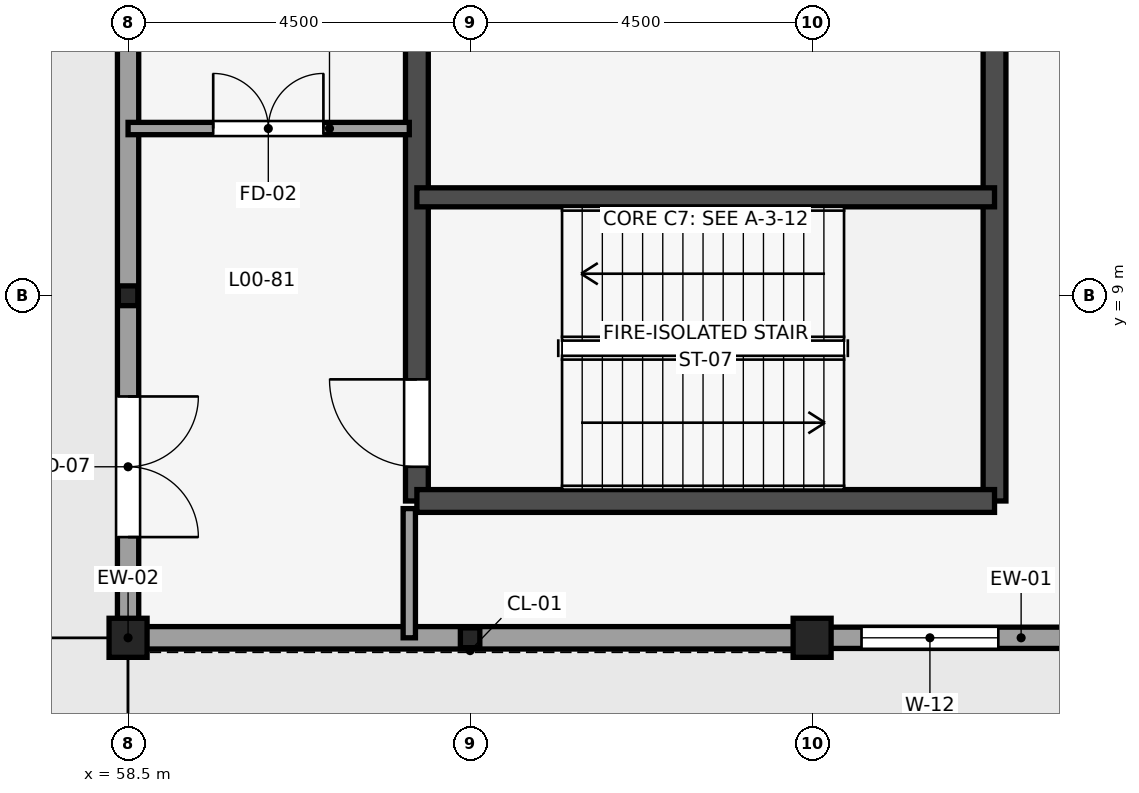
"""IFC4 building model, lengths in metres.
Left out: names, types, materials, properties, quantities, classifications, styles, units other than length and angle.
Written with IfcOpenShell. Run it as: python <this file> out.ifc"""

import sys

from ifc_helpers import new_model, si_unit, direction, frame, frame_2d, origin, origin_2d, place, context, subcontext, project, spatial, rectangle, i_section, extrude, element, fill, save


model = new_model("IFC4")
c1 = context("Model", 3, precision=1e-05, world=origin(), true_north=direction((0.0, 1.0)))
c2 = subcontext(c1, "Body", "Model", "MODEL_VIEW")
j1 = project(units=[si_unit("LENGTHUNIT", "METRE"), si_unit("PLANEANGLEUNIT", "RADIAN")], contexts=[c1])
p1 = place(None, origin())
s1 = spatial("IfcSite", under=j1, at=p1, CompositionType="ELEMENT")
p2 = place(p1, origin())
s2 = spatial("IfcBuilding", under=s1, at=p2, CompositionType="ELEMENT")
p3 = place(p2, origin())
s3 = spatial("IfcBuildingStorey", under=s2, at=p3, CompositionType="ELEMENT", Elevation=0.0)
for number, where, z_axis, x_axis in (
    (1, (58.5, 4.5, 0.0), (0.0, 0.0, 1.0), (1.0, 0.0, 0.0)),
    (2, (67.5, 4.5, 0.0), (0.0, 0.0, 1.0), (1.0, 0.0, 0.0)),
):
    element("IfcColumn", number, at=place(p3, frame(where, z_axis=z_axis, x_axis=x_axis)), inside=s3, PredefinedType="COLUMN", context=c2, shape_type="SweptSolid", body=[
        extrude(i_section(OverallWidth=0.5, OverallDepth=0.514, WebThickness=0.022, FlangeThickness=0.032, FilletRadius=0.016, at=origin_2d()), origin(), (0.0, 0.0, 1.0), 5.4),
    ])
for number, where, z_axis, x_axis in (
    (3, (63.0, 4.5, 0.0), (0.0, 0.0, 1.0), (1.0, 0.0, 0.0)),
    (4, (58.5, 9.0, 0.0), (0.0, 0.0, 1.0), (1.0, 0.0, 0.0)),
):
    element("IfcColumn", number, at=place(p3, frame(where, z_axis=z_axis, x_axis=x_axis)), inside=s3, PredefinedType="PILASTER", context=c2, shape_type="SweptSolid", body=[
        extrude(i_section(OverallWidth=0.256, OverallDepth=0.26, WebThickness=0.01, FlangeThickness=0.017, FilletRadius=0.014, at=origin_2d()), origin(), (0.0, 0.0, 1.0), 5.4),
    ])
p4 = place(p3, frame((62.3, 6.3, 0.0), z_axis=(0.0, 0.0, 1.0), x_axis=(0.0, 1.0, 0.0)))
e5 = element("IfcWall", 5, at=p4, inside=s3, PredefinedType="SHEAR", context=c2, shape_type="SweptSolid", body=[
    extrude(rectangle(XDim=7.4, YDim=0.3, at=frame_2d((3.7, 0.0))), origin(), (0.0, 0.0, 1.0), 5.4),
])
p5 = place(p4, frame((0.45, 0.0, 0.0)))
e6 = element("IfcOpeningElement", 6, at=p5, cuts=e5, PredefinedType="OPENING", context=c2, shape_type="SweptSolid", body=[
    extrude(rectangle(XDim=1.15, YDim=2.15, at=frame_2d((0.575, 1.075))), frame((0.0, 0.16, 0.0), z_axis=(0.0, -1.0, 0.0), x_axis=(1.0, 0.0, 0.0)), (0.0, 0.0, 1.0), 0.32),
])
p6 = place(p3, frame((69.9, 6.3, 0.0), z_axis=(0.0, 0.0, 1.0), x_axis=(0.0, 1.0, 0.0)))
e7 = element("IfcWall", 7, at=p6, inside=s3, PredefinedType="SHEAR", context=c2, shape_type="SweptSolid", body=[
    extrude(rectangle(XDim=7.4, YDim=0.3, at=frame_2d((3.7, 0.0))), origin(), (0.0, 0.0, 1.0), 5.4),
])
p7 = place(p3, frame((62.3, 6.3, 0.0), z_axis=(0.0, 0.0, 1.0), x_axis=(1.0, 0.0, 0.0)))
e8 = element("IfcWall", 8, at=p7, inside=s3, PredefinedType="SHEAR", context=c2, shape_type="SweptSolid", body=[
    extrude(rectangle(XDim=7.6, YDim=0.3, at=frame_2d((3.8, 0.0))), origin(), (0.0, 0.0, 1.0), 5.4),
])
p8 = place(p3, frame((62.3, 10.295, 0.0), z_axis=(0.0, 0.0, 1.0), x_axis=(1.0, 0.0, 0.0)))
e9 = element("IfcWall", 9, at=p8, inside=s3, PredefinedType="SHEAR", context=c2, shape_type="SweptSolid", body=[
    extrude(rectangle(XDim=7.6, YDim=0.25, at=frame_2d((3.8, 0.0))), origin(), (0.0, 0.0, 1.0), 5.4),
])
p9 = place(p3, frame((58.5, 4.5, 0.0), z_axis=(0.0, 0.0, 1.0), x_axis=(1.0, 0.0, 0.0)))
e10 = element("IfcWall", 10, at=p9, inside=s3, PredefinedType="STANDARD", context=c2, shape_type="SweptSolid", body=[
    extrude(rectangle(XDim=9.0, YDim=0.295, at=frame_2d((4.5, 0.0))), origin(), (0.0, 0.0, 1.0), 4.746),
])
p10 = place(p3, frame((67.5, 4.5, 0.0), z_axis=(0.0, 0.0, 1.0), x_axis=(1.0, 0.0, 0.0)))
e11 = element("IfcWall", 11, at=p10, inside=s3, PredefinedType="STANDARD", context=c2, shape_type="SweptSolid", body=[
    extrude(rectangle(XDim=9.0, YDim=0.28, at=frame_2d((4.5, 0.0))), origin(), (0.0, 0.0, 1.0), 4.746),
])
p11 = place(p10, frame((0.65, 0.0, 0.9)))
e12 = element("IfcOpeningElement", 12, at=p11, cuts=e11, PredefinedType="OPENING", context=c2, shape_type="SweptSolid", body=[
    extrude(rectangle(XDim=1.8, YDim=2.4, at=frame_2d((0.9, 1.2))), frame((0.0, 0.15, 0.0), z_axis=(0.0, -1.0, 0.0), x_axis=(1.0, 0.0, 0.0)), (0.0, 0.0, 1.0), 0.3),
])
p12 = place(p10, frame((5.55, 0.0, 0.0)))
e13 = element("IfcOpeningElement", 13, at=p12, cuts=e11, PredefinedType="OPENING", context=c2, shape_type="SweptSolid", body=[
    extrude(rectangle(XDim=2.4, YDim=2.7, at=frame_2d((1.2, 1.35))), frame((0.0, 0.15, 0.0), z_axis=(0.0, -1.0, 0.0), x_axis=(1.0, 0.0, 0.0)), (0.0, 0.0, 1.0), 0.3),
])
p13 = place(p3, frame((58.5, 13.5, 0.0), z_axis=(0.0, 0.0, 1.0), x_axis=(0.0, -1.0, 0.0)))
e14 = element("IfcWall", 14, at=p13, inside=s3, PredefinedType="STANDARD", context=c2, shape_type="SweptSolid", body=[
    extrude(rectangle(XDim=9.0, YDim=0.28, at=frame_2d((4.5, 0.0))), origin(), (0.0, 0.0, 1.0), 4.746),
])
p14 = place(p13, frame((5.825, 0.0, 0.0)))
e15 = element("IfcOpeningElement", 15, at=p14, cuts=e14, PredefinedType="OPENING", context=c2, shape_type="SweptSolid", body=[
    extrude(rectangle(XDim=1.85, YDim=2.2, at=frame_2d((0.925, 1.1))), frame((0.0, 0.15, 0.0), z_axis=(0.0, -1.0, 0.0), x_axis=(1.0, 0.0, 0.0)), (0.0, 0.0, 1.0), 0.3),
])
p15 = place(p3, frame((58.5, 11.2, 0.0), z_axis=(0.0, 0.0, 1.0), x_axis=(1.0, 0.0, 0.0)))
e16 = element("IfcWall", 16, at=p15, inside=s3, PredefinedType="PARTITIONING", context=c2, shape_type="SweptSolid", body=[
    extrude(rectangle(XDim=3.7, YDim=0.162, at=frame_2d((1.85, 0.0))), origin(), (0.0, 0.0, 1.0), 5.22),
])
p16 = place(p15, frame((1.12, 0.0, 0.0)))
e17 = element("IfcOpeningElement", 17, at=p16, cuts=e16, PredefinedType="OPENING", context=c2, shape_type="SweptSolid", body=[
    extrude(rectangle(XDim=1.45, YDim=2.2, at=frame_2d((0.725, 1.1))), frame((0.0, 0.091, 0.0), z_axis=(0.0, -1.0, 0.0), x_axis=(1.0, 0.0, 0.0)), (0.0, 0.0, 1.0), 0.182),
])
p17 = place(p3, frame((62.2, 4.5, 0.0), z_axis=(0.0, 0.0, 1.0), x_axis=(0.0, 1.0, 0.0)))
e18 = element("IfcWall", 18, at=p17, inside=s3, PredefinedType="PARTITIONING", context=c2, shape_type="SweptSolid", body=[
    extrude(rectangle(XDim=1.7, YDim=0.162, at=frame_2d((0.85, 0.0))), origin(), (0.0, 0.0, 1.0), 5.22),
])
p18 = place(p11, origin())
e19 = element("IfcWindow", 19, at=p18, inside=s3, PartitioningType="SINGLE_PANEL", PredefinedType="WINDOW", context=c2, shape_type="SweptSolid", body=[
    extrude(rectangle(XDim=1.8, YDim=2.4, at=frame_2d((0.9, 1.2))), frame((0.0, 0.03, 0.0), z_axis=(0.0, -1.0, 0.0), x_axis=(1.0, 0.0, 0.0)), (0.0, 0.0, 1.0), 0.06),
])
fill(e12, e19)
p19 = place(p14, origin())
e20 = element("IfcDoor", 20, at=p19, inside=s3, OperationType="DOUBLE_DOOR_SINGLE_SWING", PredefinedType="DOOR", context=c2, shape_type="SweptSolid", body=[
    extrude(rectangle(XDim=1.85, YDim=2.2, at=frame_2d((0.925, 1.1))), frame((0.0, 0.025, 0.0), z_axis=(0.0, -1.0, 0.0), x_axis=(1.0, 0.0, 0.0)), (0.0, 0.0, 1.0), 0.05),
])
fill(e15, e20)
p20 = place(p5, origin())
e21 = element("IfcDoor", 21, at=p20, inside=s3, OperationType="SINGLE_SWING_RIGHT", PredefinedType="DOOR", context=c2, shape_type="SweptSolid", body=[
    extrude(rectangle(XDim=1.15, YDim=2.15, at=frame_2d((0.575, 1.075))), frame((0.0, 0.025, 0.0), z_axis=(0.0, -1.0, 0.0), x_axis=(1.0, 0.0, 0.0)), (0.0, 0.0, 1.0), 0.05),
])
fill(e6, e21)
p21 = place(p16, origin())
e22 = element("IfcDoor", 22, at=p21, inside=s3, OperationType="DOUBLE_DOOR_SINGLE_SWING", PredefinedType="DOOR", context=c2, shape_type="SweptSolid", body=[
    extrude(rectangle(XDim=1.45, YDim=2.2, at=frame_2d((0.725, 1.1))), frame((0.0, 0.025, 0.0), z_axis=(0.0, -1.0, 0.0), x_axis=(1.0, 0.0, 0.0)), (0.0, 0.0, 1.0), 0.05),
])
fill(e17, e22)
save(model, sys.argv[1])
